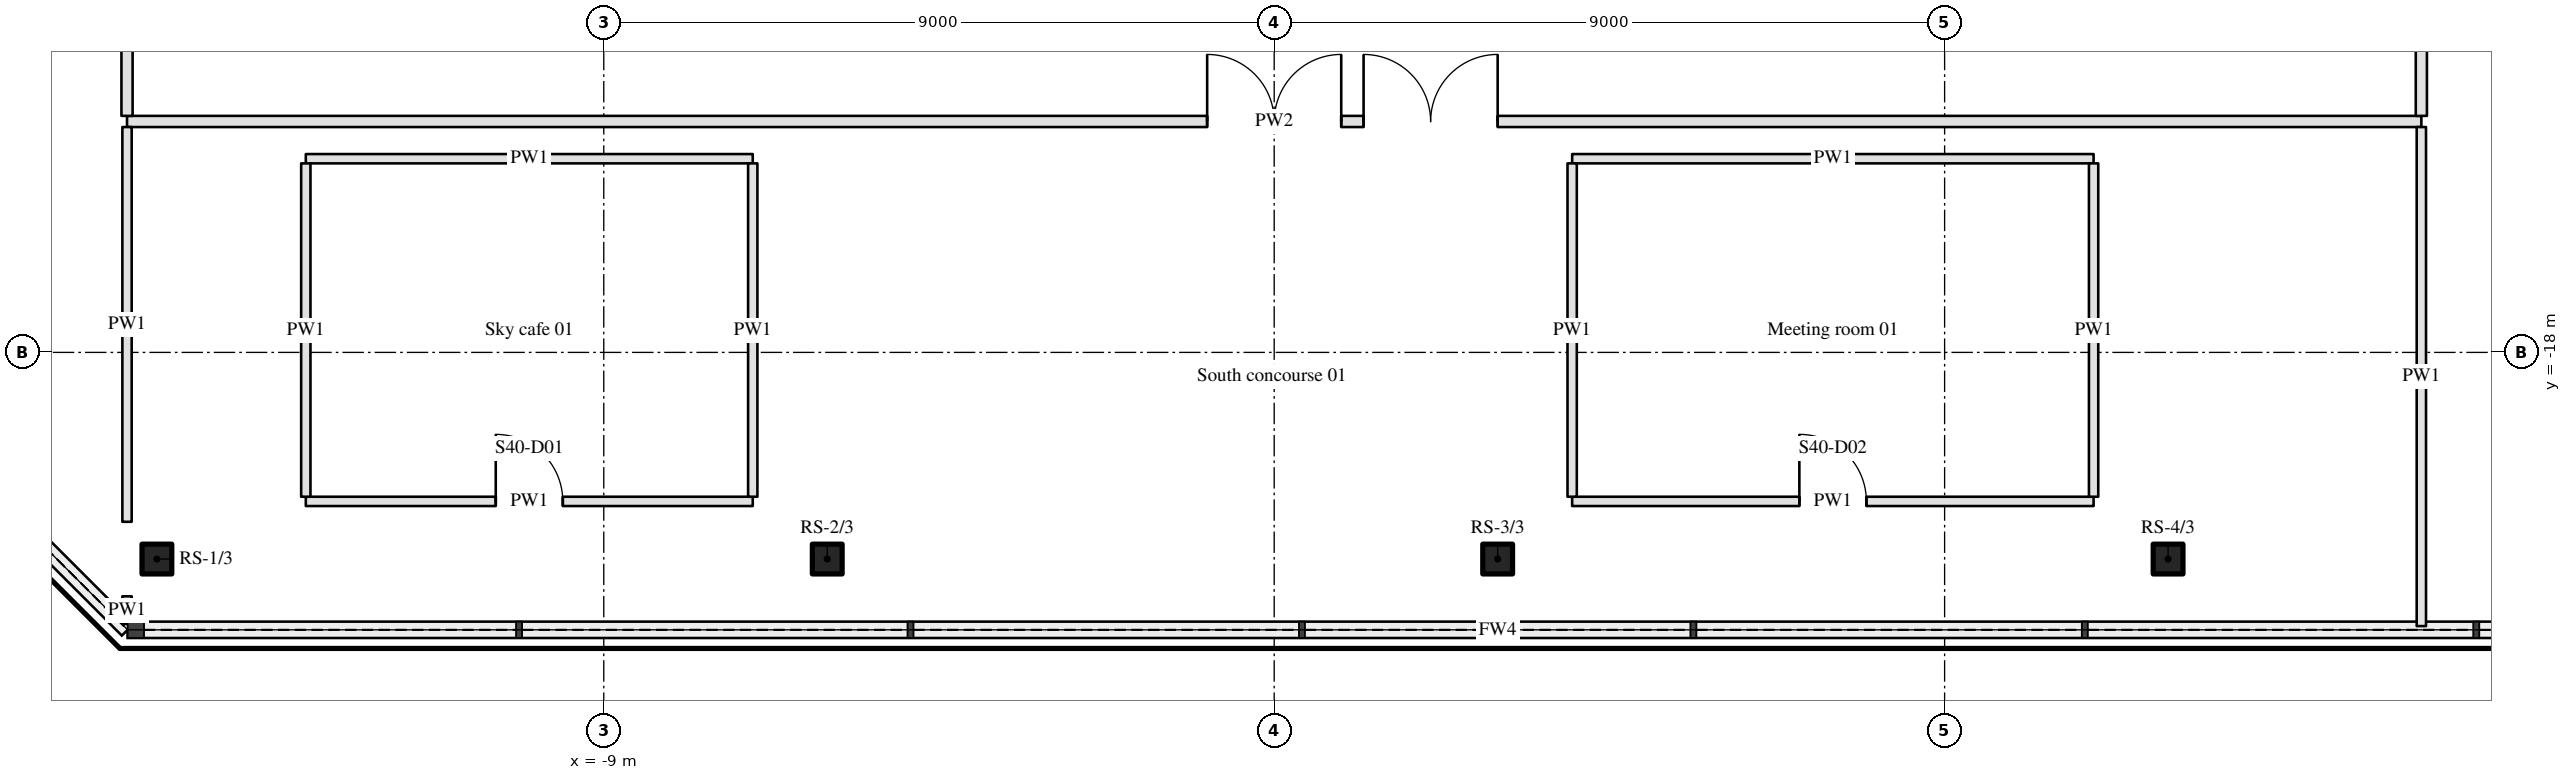
"""IFC4 building model, lengths in metres.
Left out: names, types, materials, properties, quantities, classifications, styles, units other than length and angle.
Written with IfcOpenShell. Run it as: python <this file> out.ifc"""

import sys

from ifc_helpers import new_model, si_unit, direction, frame, frame_2d, origin, origin_2d, place, context, subcontext, project, spatial, rectangle, hollow_rectangle, extrude, element, fill, save


model = new_model("IFC4")
c1 = context("Model", 3, precision=1e-05, world=origin(), true_north=direction((0.0, 1.0)))
c2 = subcontext(c1, "Body", "Model", "MODEL_VIEW")
j1 = project(units=[si_unit("LENGTHUNIT", "METRE"), si_unit("PLANEANGLEUNIT", "RADIAN")], contexts=[c1])
p1 = place(None, origin())
s1 = spatial("IfcSite", under=j1, at=p1, CompositionType="ELEMENT")
p2 = place(p1, origin())
s2 = spatial("IfcBuilding", under=s1, at=p2, CompositionType="ELEMENT")
p3 = place(p2, frame((0.0, 0.0, 162.3)))
s3 = spatial("IfcBuildingStorey", under=s2, at=p3, CompositionType="ELEMENT", Elevation=162.3)
for number, where, z_axis, x_axis in (
    (1, (-14.999, -20.774, 0.0), (0.0, 0.0, 1.0), (1.0, 0.0, 0.0)),
    (2, (-6.0, -20.774, 0.0), (0.0, 0.0, 1.0), (1.0, 0.0, 0.0)),
    (3, (3.0, -20.774, 0.0), (0.0, 0.0, 1.0), (1.0, 0.0, 0.0)),
    (4, (12.0, -20.774, 0.0), (0.0, 0.0, 1.0), (1.0, 0.0, 0.0)),
):
    element("IfcColumn", number, at=place(p3, frame(where, z_axis=z_axis, x_axis=x_axis)), inside=s3, PredefinedType="COLUMN", context=c2, shape_type="SweptSolid", body=[
        extrude(hollow_rectangle(XDim=0.4, YDim=0.4, WallThickness=0.02, InnerFilletRadius=0.03, OuterFilletRadius=0.05, at=origin_2d()), origin(), (0.0, 0.0, 1.0), 5.4),
    ])
p4 = place(p3, frame((-13.0, -20.0, 0.0), z_axis=(0.0, 0.0, 1.0), x_axis=(1.0, 0.0, 0.0)))
e5 = element("IfcWall", 5, at=p4, inside=s3, PredefinedType="PARTITIONING", context=c2, shape_type="SweptSolid", body=[
    extrude(rectangle(XDim=6.0, YDim=0.125, at=frame_2d((3.0, 0.0))), origin(), (0.0, 0.0, 1.0), 4.46),
])
p5 = place(p4, frame((2.55, 0.0, 0.0)))
e6 = element("IfcOpeningElement", 6, at=p5, cuts=e5, PredefinedType="OPENING", context=c2, shape_type="SweptSolid", body=[
    extrude(rectangle(XDim=0.9, YDim=2.1, at=frame_2d((0.45, 1.05))), frame((0.0, 0.073, 0.0), z_axis=(0.0, -1.0, 0.0), x_axis=(1.0, 0.0, 0.0)), (0.0, 0.0, 1.0), 0.145),
])
p6 = place(p3, frame((4.0, -20.0, 0.0), z_axis=(0.0, 0.0, 1.0), x_axis=(1.0, 0.0, 0.0)))
e7 = element("IfcWall", 7, at=p6, inside=s3, PredefinedType="PARTITIONING", context=c2, shape_type="SweptSolid", body=[
    extrude(rectangle(XDim=7.0, YDim=0.125, at=frame_2d((3.5, 0.0))), origin(), (0.0, 0.0, 1.0), 4.46),
])
p7 = place(p6, frame((3.05, 0.0, 0.0)))
e8 = element("IfcOpeningElement", 8, at=p7, cuts=e7, PredefinedType="OPENING", context=c2, shape_type="SweptSolid", body=[
    extrude(rectangle(XDim=0.9, YDim=2.1, at=frame_2d((0.45, 1.05))), frame((0.0, 0.073, 0.0), z_axis=(0.0, -1.0, 0.0), x_axis=(1.0, 0.0, 0.0)), (0.0, 0.0, 1.0), 0.145),
])
p8 = place(p3, frame((-13.0, -15.4, 0.0), z_axis=(0.0, 0.0, 1.0), x_axis=(1.0, 0.0, 0.0)))
e9 = element("IfcWall", 9, at=p8, inside=s3, PredefinedType="PARTITIONING", context=c2, shape_type="SweptSolid", body=[
    extrude(rectangle(XDim=6.0, YDim=0.125, at=frame_2d((3.0, 0.0))), origin(), (0.0, 0.0, 1.0), 4.46),
])
p9 = place(p3, frame((4.0, -15.4, 0.0), z_axis=(0.0, 0.0, 1.0), x_axis=(1.0, 0.0, 0.0)))
e10 = element("IfcWall", 10, at=p9, inside=s3, PredefinedType="PARTITIONING", context=c2, shape_type="SweptSolid", body=[
    extrude(rectangle(XDim=7.0, YDim=0.125, at=frame_2d((3.5, 0.0))), origin(), (0.0, 0.0, 1.0), 4.46),
])
p10 = place(p3, frame((-15.4, -14.9, 0.0), z_axis=(0.0, 0.0, 1.0), x_axis=(1.0, 0.0, 0.0)))
e11 = element("IfcWall", 11, at=p10, inside=s3, PredefinedType="PARTITIONING", context=c2, shape_type="SweptSolid", body=[
    extrude(rectangle(XDim=30.8, YDim=0.15, at=frame_2d((15.4, 0.0))), origin(), (0.0, 0.0, 1.0), 4.46),
])
p11 = place(p10, frame((14.5, 0.0, 0.0)))
e12 = element("IfcOpeningElement", 12, at=p11, cuts=e11, PredefinedType="OPENING", context=c2, shape_type="SweptSolid", body=[
    extrude(rectangle(XDim=1.8, YDim=2.1, at=frame_2d((0.9, 1.05))), frame((0.0, 0.085, 0.0), z_axis=(0.0, -1.0, 0.0), x_axis=(1.0, 0.0, 0.0)), (0.0, 0.0, 1.0), 0.17),
])
p12 = place(p10, frame((16.6, 0.0, 0.0)))
e13 = element("IfcOpeningElement", 13, at=p12, cuts=e11, PredefinedType="OPENING", context=c2, shape_type="SweptSolid", body=[
    extrude(rectangle(XDim=1.8, YDim=2.1, at=frame_2d((0.9, 1.05))), frame((0.0, 0.085, 0.0), z_axis=(0.0, -1.0, 0.0), x_axis=(1.0, 0.0, 0.0)), (0.0, 0.0, 1.0), 0.17),
])
p13 = place(p3, frame((-15.4, -21.646, 0.0), z_axis=(0.0, 0.0, 1.0), x_axis=(0.0, 1.0, 0.0)))
e14 = element("IfcWall", 14, at=p13, inside=s3, PredefinedType="PARTITIONING", context=c2, shape_type="SweptSolid", body=[
    extrude(rectangle(XDim=0.372, YDim=0.125, at=frame_2d((0.186, 0.0))), origin(), (0.0, 0.0, 1.0), 4.46),
])
p14 = place(p3, frame((-15.4, -20.274, 0.0), z_axis=(0.0, 0.0, 1.0), x_axis=(0.0, 1.0, 0.0)))
e15 = element("IfcWall", 15, at=p14, inside=s3, PredefinedType="PARTITIONING", context=c2, shape_type="SweptSolid", body=[
    extrude(rectangle(XDim=5.299, YDim=0.125, at=frame_2d((2.649, 0.0))), origin(), (0.0, 0.0, 1.0), 4.46),
])
p15 = place(p3, frame((-15.4, 8.35, 0.0), z_axis=(0.0, 0.0, 1.0), x_axis=(0.0, -1.0, 0.0)))
e16 = element("IfcWall", 16, at=p15, inside=s3, PredefinedType="PARTITIONING", context=c2, shape_type="SweptSolid", body=[
    extrude(rectangle(XDim=23.175, YDim=0.15, at=frame_2d((11.587, 0.0))), origin(), (0.0, 0.0, 1.0), 4.46),
])
p16 = place(p15, frame((11.712, 0.0, 0.0)))
e17 = element("IfcOpeningElement", 17, at=p16, cuts=e16, PredefinedType="OPENING", context=c2, shape_type="SweptSolid", body=[
    extrude(rectangle(XDim=1.8, YDim=2.1, at=frame_2d((0.9, 1.05))), frame((0.0, 0.085, 0.0), z_axis=(0.0, -1.0, 0.0), x_axis=(1.0, 0.0, 0.0)), (0.0, 0.0, 1.0), 0.17),
])
p17 = place(p15, frame((9.613, 0.0, 0.0)))
e18 = element("IfcOpeningElement", 18, at=p17, cuts=e16, PredefinedType="OPENING", context=c2, shape_type="SweptSolid", body=[
    extrude(rectangle(XDim=1.8, YDim=2.1, at=frame_2d((0.9, 1.05))), frame((0.0, 0.085, 0.0), z_axis=(0.0, -1.0, 0.0), x_axis=(1.0, 0.0, 0.0)), (0.0, 0.0, 1.0), 0.17),
])
for number, where, z_axis, x_axis in (
    (19, (-13.0, -19.938, 0.0), (0.0, 0.0, 1.0), (0.0, 1.0, 0.0)),
    (20, (-7.0, -19.938, 0.0), (0.0, 0.0, 1.0), (0.0, 1.0, 0.0)),
    (21, (4.0, -19.938, 0.0), (0.0, 0.0, 1.0), (0.0, 1.0, 0.0)),
    (22, (11.0, -19.938, 0.0), (0.0, 0.0, 1.0), (0.0, 1.0, 0.0)),
):
    element("IfcWall", number, at=place(p3, frame(where, z_axis=z_axis, x_axis=x_axis)), inside=s3, PredefinedType="PARTITIONING", context=c2, shape_type="SweptSolid", body=[
        extrude(rectangle(XDim=4.475, YDim=0.125, at=frame_2d((2.238, 0.0))), origin(), (0.0, 0.0, 1.0), 4.46),
    ])
p18 = place(p3, frame((15.4, -21.674, 0.0), z_axis=(0.0, 0.0, 1.0), x_axis=(0.0, 1.0, 0.0)))
e23 = element("IfcWall", 23, at=p18, inside=s3, PredefinedType="PARTITIONING", context=c2, shape_type="SweptSolid", body=[
    extrude(rectangle(XDim=6.699, YDim=0.125, at=frame_2d((3.35, 0.0))), origin(), (0.0, 0.0, 1.0), 4.46),
])
p19 = place(p3, frame((15.4, -14.825, 0.0), z_axis=(0.0, 0.0, 1.0), x_axis=(0.0, 1.0, 0.0)))
e24 = element("IfcWall", 24, at=p19, inside=s3, PredefinedType="PARTITIONING", context=c2, shape_type="SweptSolid", body=[
    extrude(rectangle(XDim=21.05, YDim=0.15, at=frame_2d((10.525, 0.0))), origin(), (0.0, 0.0, 1.0), 4.46),
])
p20 = place(p19, frame((9.625, 0.0, 0.0)))
e25 = element("IfcOpeningElement", 25, at=p20, cuts=e24, PredefinedType="OPENING", context=c2, shape_type="SweptSolid", body=[
    extrude(rectangle(XDim=1.8, YDim=2.1, at=frame_2d((0.9, 1.05))), frame((0.0, 0.085, 0.0), z_axis=(0.0, -1.0, 0.0), x_axis=(1.0, 0.0, 0.0)), (0.0, 0.0, 1.0), 0.17),
])
p21 = place(p19, frame((11.725, 0.0, 0.0)))
e26 = element("IfcOpeningElement", 26, at=p21, cuts=e24, PredefinedType="OPENING", context=c2, shape_type="SweptSolid", body=[
    extrude(rectangle(XDim=1.8, YDim=2.1, at=frame_2d((0.9, 1.05))), frame((0.0, 0.085, 0.0), z_axis=(0.0, -1.0, 0.0), x_axis=(1.0, 0.0, 0.0)), (0.0, 0.0, 1.0), 0.17),
])
p22 = place(p11, origin())
e27 = element("IfcDoor", 27, at=p22, inside=s3, OperationType="DOUBLE_DOOR_SINGLE_SWING", PredefinedType="DOOR", context=c2, shape_type="SweptSolid", body=[
    extrude(rectangle(XDim=1.8, YDim=2.1, at=frame_2d((0.9, 1.05))), frame((0.0, 0.025, 0.0), z_axis=(0.0, -1.0, 0.0), x_axis=(1.0, 0.0, 0.0)), (0.0, 0.0, 1.0), 0.05),
])
fill(e12, e27)
p23 = place(p12, origin())
e28 = element("IfcDoor", 28, at=p23, inside=s3, OperationType="DOUBLE_DOOR_SINGLE_SWING", PredefinedType="DOOR", context=c2, shape_type="SweptSolid", body=[
    extrude(rectangle(XDim=1.8, YDim=2.1, at=frame_2d((0.9, 1.05))), frame((0.0, 0.025, 0.0), z_axis=(0.0, -1.0, 0.0), x_axis=(1.0, 0.0, 0.0)), (0.0, 0.0, 1.0), 0.05),
])
fill(e13, e28)
p24 = place(p5, origin())
e29 = element("IfcDoor", 29, at=p24, inside=s3, OperationType="SINGLE_SWING_LEFT", PredefinedType="DOOR", context=c2, shape_type="SweptSolid", body=[
    extrude(rectangle(XDim=0.9, YDim=2.1, at=frame_2d((0.45, 1.05))), frame((0.0, 0.025, 0.0), z_axis=(0.0, -1.0, 0.0), x_axis=(1.0, 0.0, 0.0)), (0.0, 0.0, 1.0), 0.05),
])
fill(e6, e29)
p25 = place(p7, origin())
e30 = element("IfcDoor", 30, at=p25, inside=s3, OperationType="SINGLE_SWING_LEFT", PredefinedType="DOOR", context=c2, shape_type="SweptSolid", body=[
    extrude(rectangle(XDim=0.9, YDim=2.1, at=frame_2d((0.45, 1.05))), frame((0.0, 0.025, 0.0), z_axis=(0.0, -1.0, 0.0), x_axis=(1.0, 0.0, 0.0)), (0.0, 0.0, 1.0), 0.05),
])
fill(e8, e30)
save(model, sys.argv[1])
